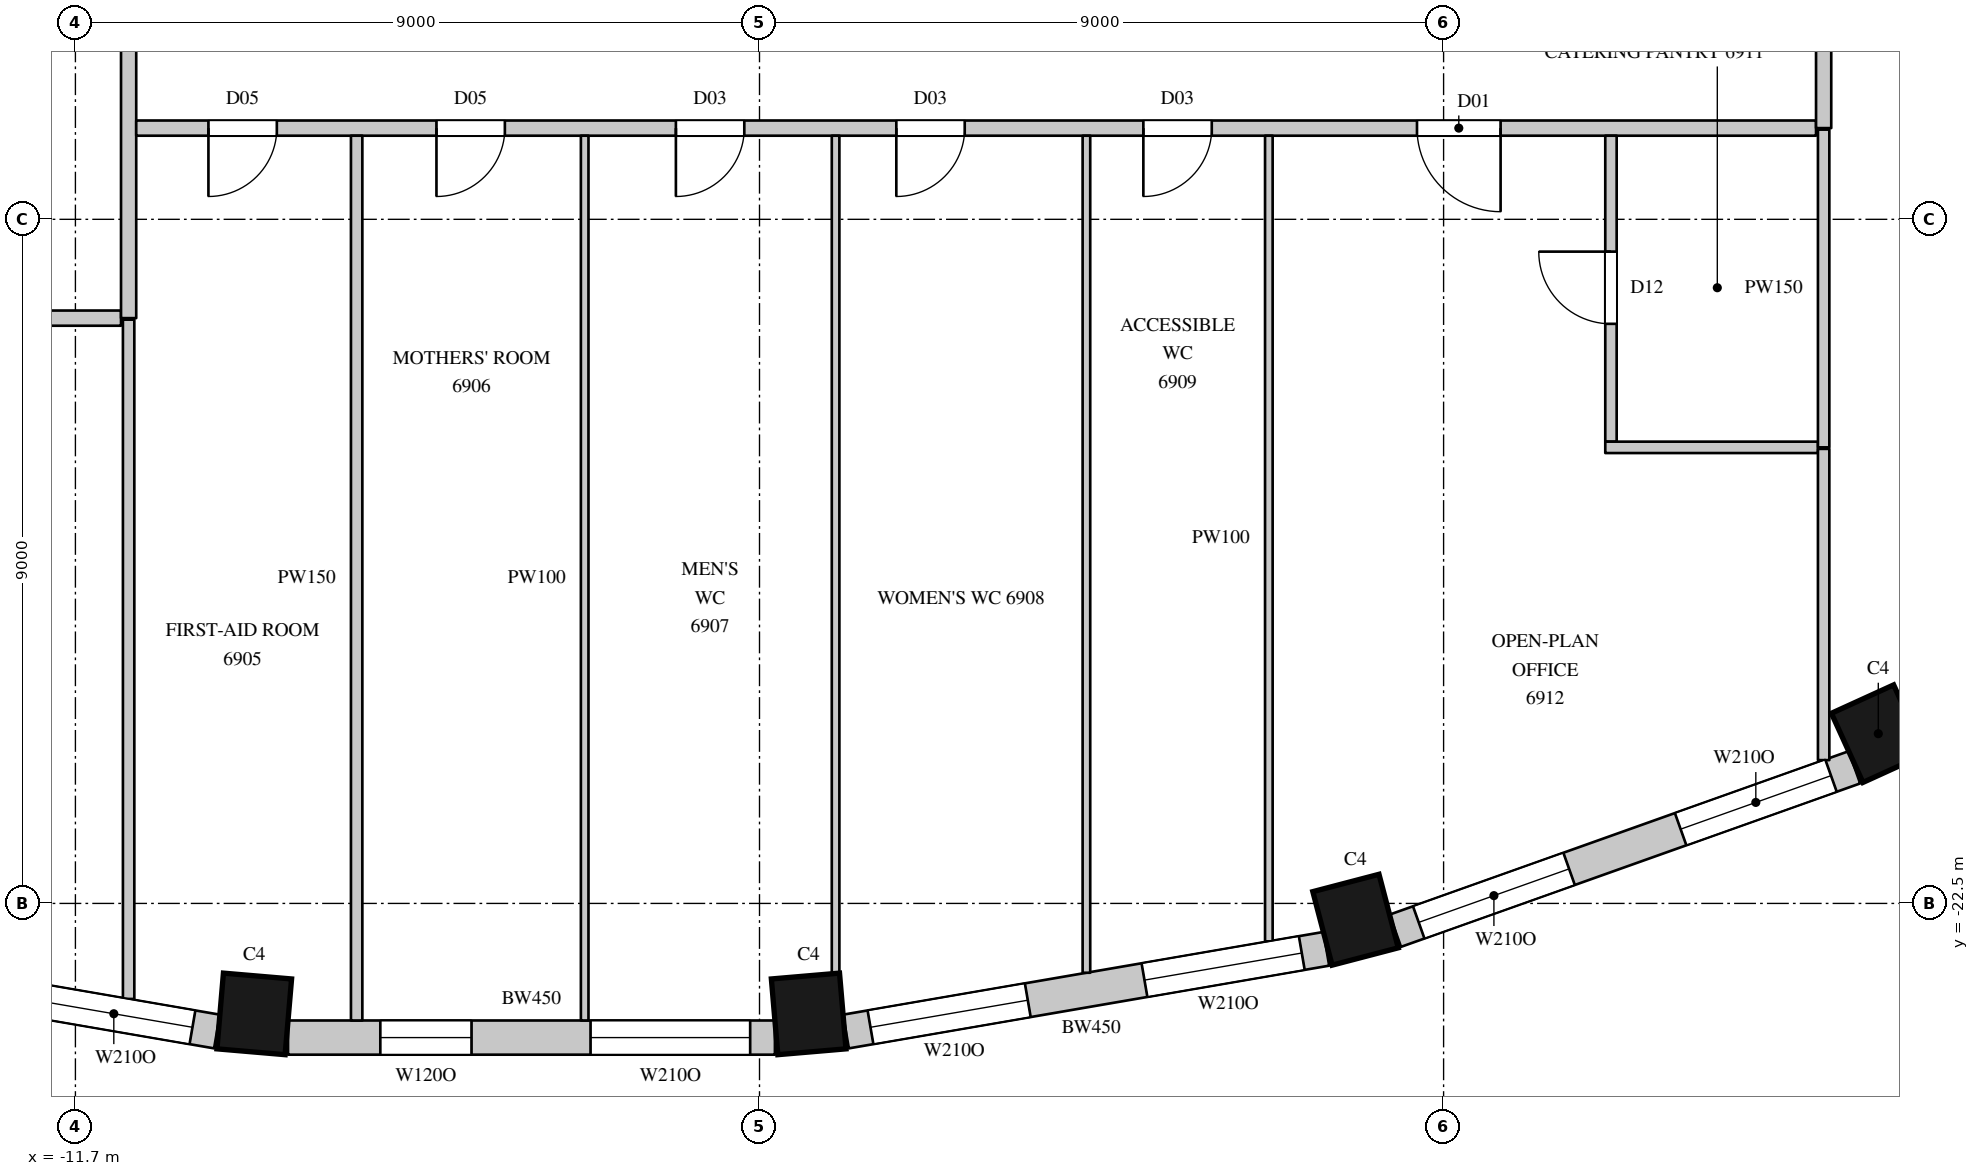
"""IFC4 building model, lengths in metres.
Left out: names, types, materials, properties, quantities, classifications, styles, units other than length and angle.
Written with IfcOpenShell. Run it as: python <this file> out.ifc"""

import sys

from ifc_helpers import new_model, si_unit, direction, frame, frame_2d, origin, origin_2d, place, context, subcontext, project, spatial, rectangle, extrude, element, fill, save


model = new_model("IFC4")
c1 = context("Model", 3, precision=1e-05, world=origin(), true_north=direction((0.0, 1.0)))
c2 = subcontext(c1, "Body", "Model", "MODEL_VIEW")
j1 = project(units=[si_unit("LENGTHUNIT", "METRE"), si_unit("PLANEANGLEUNIT", "RADIAN")], contexts=[c1])
p1 = place(None, origin())
s1 = spatial("IfcSite", under=j1, at=p1, CompositionType="ELEMENT")
p2 = place(p1, origin())
s2 = spatial("IfcBuilding", under=s1, at=p2, CompositionType="ELEMENT")
p3 = place(p2, frame((0.0, 0.0, 304.9)))
s3 = spatial("IfcBuildingStorey", under=s2, at=p3, CompositionType="ELEMENT", Elevation=304.9)
for number, where, z_axis, x_axis in (
    (1, (-9.347, -23.954, 0.0), (0.0, 0.0, 1.0), (0.996, -0.085, 0.0)),
    (2, (-2.053, -23.954, 0.0), (0.0, 0.0, 1.0), (0.996, 0.085, 0.0)),
    (3, (5.142, -22.715, 0.0), (0.0, 0.0, 1.0), (0.967, 0.253, 0.0)),
    (4, (12.019, -20.267, 0.0), (0.0, 0.0, 1.0), (0.91, 0.415, 0.0)),
):
    element("IfcColumn", number, at=place(p3, frame(where, z_axis=z_axis, x_axis=x_axis)), inside=s3, PredefinedType="COLUMN", context=c2, shape_type="SweptSolid", body=[
        extrude(rectangle(XDim=0.9, YDim=1.0, at=origin_2d()), origin(), (0.0, 0.0, 1.0), 4.1),
    ])
p4 = place(p3, frame((-16.157, -23.097, 0.0), z_axis=(0.0, 0.0, 1.0), x_axis=(0.985502073964, -0.169663379113, 0.0)))
e5 = element("IfcWall", 5, at=p4, inside=s3, PredefinedType="SOLIDWALL", context=c2, shape_type="SweptSolid", body=[
    extrude(rectangle(XDim=6.412, YDim=0.45, at=frame_2d((3.206, 0.0))), origin(), (0.0, 0.0, 1.0), 3.8),
])
p5 = place(p4, frame((0.327, 0.0, 1.05)))
e6 = element("IfcOpeningElement", 6, at=p5, cuts=e5, PredefinedType="OPENING", context=c2, shape_type="SweptSolid", body=[
    extrude(rectangle(XDim=2.1, YDim=2.4, at=frame_2d((1.05, 1.2))), frame((0.0, 0.235, 0.0), z_axis=(0.0, -1.0, 0.0), x_axis=(1.0, 0.0, 0.0)), (0.0, 0.0, 1.0), 0.47),
])
p6 = place(p4, frame((3.985, 0.0, 1.05)))
e7 = element("IfcOpeningElement", 7, at=p6, cuts=e5, PredefinedType="OPENING", context=c2, shape_type="SweptSolid", body=[
    extrude(rectangle(XDim=2.1, YDim=2.4, at=frame_2d((1.05, 1.2))), frame((0.0, 0.235, 0.0), z_axis=(0.0, -1.0, 0.0), x_axis=(1.0, 0.0, 0.0)), (0.0, 0.0, 1.0), 0.47),
])
p7 = place(p3, frame((-8.903, -24.265, 0.0), z_axis=(0.0, 0.0, 1.0), x_axis=(1.0, 0.0, 0.0)))
e8 = element("IfcWall", 8, at=p7, inside=s3, PredefinedType="SOLIDWALL", context=c2, shape_type="SweptSolid", body=[
    extrude(rectangle(XDim=6.406, YDim=0.45, at=frame_2d((3.203, 0.0))), origin(), (0.0, 0.0, 1.0), 3.8),
])
p8 = place(p7, frame((3.98, 0.0, 1.05)))
e9 = element("IfcOpeningElement", 9, at=p8, cuts=e8, PredefinedType="OPENING", context=c2, shape_type="SweptSolid", body=[
    extrude(rectangle(XDim=2.1, YDim=2.4, at=frame_2d((1.05, 1.2))), frame((0.0, 0.235, 0.0), z_axis=(0.0, -1.0, 0.0), x_axis=(1.0, 0.0, 0.0)), (0.0, 0.0, 1.0), 0.47),
])
p9 = place(p7, frame((1.214, 0.0, 1.05)))
e10 = element("IfcOpeningElement", 10, at=p9, cuts=e8, PredefinedType="OPENING", context=c2, shape_type="SweptSolid", body=[
    extrude(rectangle(XDim=1.2, YDim=2.4, at=frame_2d((0.6, 1.2))), frame((0.0, 0.235, 0.0), z_axis=(0.0, -1.0, 0.0), x_axis=(1.0, 0.0, 0.0)), (0.0, 0.0, 1.0), 0.47),
])
p10 = place(p3, frame((-1.562, -24.185, 0.0), z_axis=(0.0, 0.0, 1.0), x_axis=(0.985502073964, 0.169663379113, 0.0)))
e11 = element("IfcWall", 11, at=p10, inside=s3, PredefinedType="SOLIDWALL", context=c2, shape_type="SweptSolid", body=[
    extrude(rectangle(XDim=6.412, YDim=0.45, at=frame_2d((3.206, 0.0))), origin(), (0.0, 0.0, 1.0), 3.8),
])
p11 = place(p10, frame((0.327, 0.0, 1.05)))
e12 = element("IfcOpeningElement", 12, at=p11, cuts=e11, PredefinedType="OPENING", context=c2, shape_type="SweptSolid", body=[
    extrude(rectangle(XDim=2.1, YDim=2.4, at=frame_2d((1.05, 1.2))), frame((0.0, 0.235, 0.0), z_axis=(0.0, -1.0, 0.0), x_axis=(1.0, 0.0, 0.0)), (0.0, 0.0, 1.0), 0.47),
])
p12 = place(p10, frame((3.985, 0.0, 1.05)))
e13 = element("IfcOpeningElement", 13, at=p12, cuts=e11, PredefinedType="OPENING", context=c2, shape_type="SweptSolid", body=[
    extrude(rectangle(XDim=2.1, YDim=2.4, at=frame_2d((1.05, 1.2))), frame((0.0, 0.235, 0.0), z_axis=(0.0, -1.0, 0.0), x_axis=(1.0, 0.0, 0.0)), (0.0, 0.0, 1.0), 0.47),
])
p13 = place(p3, frame((5.665, -22.859, 0.0), z_axis=(0.0, 0.0, 1.0), x_axis=(0.942108340262, 0.335308626803, 0.0)))
e14 = element("IfcWall", 14, at=p13, inside=s3, PredefinedType="SOLIDWALL", context=c2, shape_type="SweptSolid", body=[
    extrude(rectangle(XDim=6.412, YDim=0.45, at=frame_2d((3.206, 0.0))), origin(), (0.0, 0.0, 1.0), 3.8),
])
p14 = place(p13, frame((0.327, 0.0, 1.05)))
e15 = element("IfcOpeningElement", 15, at=p14, cuts=e14, PredefinedType="OPENING", context=c2, shape_type="SweptSolid", body=[
    extrude(rectangle(XDim=2.1, YDim=2.4, at=frame_2d((1.05, 1.2))), frame((0.0, 0.235, 0.0), z_axis=(0.0, -1.0, 0.0), x_axis=(1.0, 0.0, 0.0)), (0.0, 0.0, 1.0), 0.47),
])
p15 = place(p13, frame((3.985, 0.0, 1.05)))
e16 = element("IfcOpeningElement", 16, at=p15, cuts=e14, PredefinedType="OPENING", context=c2, shape_type="SweptSolid", body=[
    extrude(rectangle(XDim=2.1, YDim=2.4, at=frame_2d((1.05, 1.2))), frame((0.0, 0.235, 0.0), z_axis=(0.0, -1.0, 0.0), x_axis=(1.0, 0.0, 0.0)), (0.0, 0.0, 1.0), 0.47),
])
p16 = place(p3, frame((-13.97, -14.8, 0.0), z_axis=(0.0, 0.0, 1.0), x_axis=(1.0, 0.0, 0.0)))
e17 = element("IfcWall", 17, at=p16, inside=s3, PredefinedType="PARTITIONING", context=c2, shape_type="SweptSolid", body=[
    extrude(rectangle(XDim=2.87, YDim=0.2, at=frame_2d((1.435, 0.0))), origin(), (0.0, 0.0, 1.0), 3.8),
])
p17 = place(p3, frame((-11.0, -14.8, 0.0), z_axis=(0.0, 0.0, 1.0), x_axis=(0.0, 1.0, 0.0)))
e18 = element("IfcWall", 18, at=p17, inside=s3, PredefinedType="PARTITIONING", context=c2, shape_type="SweptSolid", body=[
    extrude(rectangle(XDim=29.5, YDim=0.2, at=frame_2d((14.75, 0.0))), origin(), (0.0, 0.0, 1.0), 3.8),
])
p18 = place(p17, frame((14.05, 0.0, 0.0)))
e19 = element("IfcOpeningElement", 19, at=p18, cuts=e18, PredefinedType="OPENING", context=c2, shape_type="SweptSolid", body=[
    extrude(rectangle(XDim=1.5, YDim=2.4, at=frame_2d((0.75, 1.2))), frame((0.0, 0.11, 0.0), z_axis=(0.0, -1.0, 0.0), x_axis=(1.0, 0.0, 0.0)), (0.0, 0.0, 1.0), 0.22),
])
p19 = place(p3, frame((-10.9, -12.3, 0.0), z_axis=(0.0, 0.0, 1.0), x_axis=(1.0, 0.0, 0.0)))
e20 = element("IfcWall", 20, at=p19, inside=s3, PredefinedType="PARTITIONING", context=c2, shape_type="SweptSolid", body=[
    extrude(rectangle(XDim=22.1, YDim=0.2, at=frame_2d((11.05, 0.0))), origin(), (0.0, 0.0, 1.0), 3.8),
])
p20 = place(p19, frame((0.95, 0.0, 0.0)))
e21 = element("IfcOpeningElement", 21, at=p20, cuts=e20, PredefinedType="OPENING", context=c2, shape_type="SweptSolid", body=[
    extrude(rectangle(XDim=0.9, YDim=2.2, at=frame_2d((0.45, 1.1))), frame((0.0, 0.11, 0.0), z_axis=(0.0, -1.0, 0.0), x_axis=(1.0, 0.0, 0.0)), (0.0, 0.0, 1.0), 0.22),
])
p21 = place(p19, frame((3.95, 0.0, 0.0)))
e22 = element("IfcOpeningElement", 22, at=p21, cuts=e20, PredefinedType="OPENING", context=c2, shape_type="SweptSolid", body=[
    extrude(rectangle(XDim=0.9, YDim=2.2, at=frame_2d((0.45, 1.1))), frame((0.0, 0.11, 0.0), z_axis=(0.0, -1.0, 0.0), x_axis=(1.0, 0.0, 0.0)), (0.0, 0.0, 1.0), 0.22),
])
p22 = place(p19, frame((7.1, 0.0, 0.0)))
e23 = element("IfcOpeningElement", 23, at=p22, cuts=e20, PredefinedType="OPENING", context=c2, shape_type="SweptSolid", body=[
    extrude(rectangle(XDim=0.9, YDim=2.2, at=frame_2d((0.45, 1.1))), frame((0.0, 0.11, 0.0), z_axis=(0.0, -1.0, 0.0), x_axis=(1.0, 0.0, 0.0)), (0.0, 0.0, 1.0), 0.22),
])
p23 = place(p19, frame((10.0, 0.0, 0.0)))
e24 = element("IfcOpeningElement", 24, at=p23, cuts=e20, PredefinedType="OPENING", context=c2, shape_type="SweptSolid", body=[
    extrude(rectangle(XDim=0.9, YDim=2.2, at=frame_2d((0.45, 1.1))), frame((0.0, 0.11, 0.0), z_axis=(0.0, -1.0, 0.0), x_axis=(1.0, 0.0, 0.0)), (0.0, 0.0, 1.0), 0.22),
])
p24 = place(p19, frame((13.25, 0.0, 0.0)))
e25 = element("IfcOpeningElement", 25, at=p24, cuts=e20, PredefinedType="OPENING", context=c2, shape_type="SweptSolid", body=[
    extrude(rectangle(XDim=0.9, YDim=2.2, at=frame_2d((0.45, 1.1))), frame((0.0, 0.11, 0.0), z_axis=(0.0, -1.0, 0.0), x_axis=(1.0, 0.0, 0.0)), (0.0, 0.0, 1.0), 0.22),
])
p25 = place(p19, frame((16.85, 0.0, 0.0)))
e26 = element("IfcOpeningElement", 26, at=p25, cuts=e20, PredefinedType="OPENING", context=c2, shape_type="SweptSolid", body=[
    extrude(rectangle(XDim=1.1, YDim=2.4, at=frame_2d((0.55, 1.2))), frame((0.0, 0.11, 0.0), z_axis=(0.0, -1.0, 0.0), x_axis=(1.0, 0.0, 0.0)), (0.0, 0.0, 1.0), 0.22),
])
p26 = place(p3, frame((11.3, -12.3, 0.0), z_axis=(0.0, 0.0, 1.0), x_axis=(0.0, 1.0, 0.0)))
e27 = element("IfcWall", 27, at=p26, inside=s3, PredefinedType="PARTITIONING", context=c2, shape_type="SweptSolid", body=[
    extrude(rectangle(XDim=24.5, YDim=0.2, at=frame_2d((12.25, 0.0))), origin(), (0.0, 0.0, 1.0), 3.8),
])
p27 = place(p26, frame((10.15, 0.0, 0.0)))
e28 = element("IfcOpeningElement", 28, at=p27, cuts=e27, PredefinedType="OPENING", context=c2, shape_type="SweptSolid", body=[
    extrude(rectangle(XDim=1.5, YDim=2.4, at=frame_2d((0.75, 1.2))), frame((0.0, 0.11, 0.0), z_axis=(0.0, -1.0, 0.0), x_axis=(1.0, 0.0, 0.0)), (0.0, 0.0, 1.0), 0.22),
])
p28 = place(p3, frame((-11.0, -23.757, 0.0), z_axis=(0.0, 0.0, 1.0), x_axis=(0.0, 1.0, 0.0)))
e29 = element("IfcWall", 29, at=p28, inside=s3, PredefinedType="PARTITIONING", context=c2, shape_type="SweptSolid", body=[
    extrude(rectangle(XDim=8.937, YDim=0.15, at=frame_2d((4.468, 0.0))), origin(), (0.0, 0.0, 1.0), 3.8),
])
p29 = place(p3, frame((-8.0, -24.04, 0.0), z_axis=(0.0, 0.0, 1.0), x_axis=(0.0, 1.0, 0.0)))
e30 = element("IfcWall", 30, at=p29, inside=s3, PredefinedType="PARTITIONING", context=c2, shape_type="SweptSolid", body=[
    extrude(rectangle(XDim=11.64, YDim=0.15, at=frame_2d((5.82, 0.0))), origin(), (0.0, 0.0, 1.0), 3.8),
])
p30 = place(p3, frame((8.502, -16.425, 0.0), z_axis=(0.0, 0.0, 1.0), x_axis=(0.0, 1.0, 0.0)))
e31 = element("IfcWall", 31, at=p30, inside=s3, PredefinedType="PARTITIONING", context=c2, shape_type="SweptSolid", body=[
    extrude(rectangle(XDim=4.025, YDim=0.15, at=frame_2d((2.013, 0.0))), origin(), (0.0, 0.0, 1.0), 3.8),
])
p31 = place(p30, frame((1.55, 0.0, 0.0)))
e32 = element("IfcOpeningElement", 32, at=p31, cuts=e31, PredefinedType="OPENING", context=c2, shape_type="SweptSolid", body=[
    extrude(rectangle(XDim=0.95, YDim=2.2, at=frame_2d((0.475, 1.1))), frame((0.0, 0.085, 0.0), z_axis=(0.0, -1.0, 0.0), x_axis=(1.0, 0.0, 0.0)), (0.0, 0.0, 1.0), 0.17),
])
p32 = place(p3, frame((8.427, -16.5, 0.0), z_axis=(0.0, 0.0, 1.0), x_axis=(1.0, 0.0, 0.0)))
e33 = element("IfcWall", 33, at=p32, inside=s3, PredefinedType="PARTITIONING", context=c2, shape_type="SweptSolid", body=[
    extrude(rectangle(XDim=2.798, YDim=0.15, at=frame_2d((1.399, 0.0))), origin(), (0.0, 0.0, 1.0), 3.8),
])
p33 = place(p3, frame((11.3, -20.615, 0.0), z_axis=(0.0, 0.0, 1.0), x_axis=(0.0, 1.0, 0.0)))
e34 = element("IfcWall", 34, at=p33, inside=s3, PredefinedType="PARTITIONING", context=c2, shape_type="SweptSolid", body=[
    extrude(rectangle(XDim=4.095, YDim=0.15, at=frame_2d((2.047, 0.0))), origin(), (0.0, 0.0, 1.0), 3.8),
])
p34 = place(p3, frame((11.3, -16.5, 0.0), z_axis=(0.0, 0.0, 1.0), x_axis=(0.0, 1.0, 0.0)))
e35 = element("IfcWall", 35, at=p34, inside=s3, PredefinedType="PARTITIONING", context=c2, shape_type="SweptSolid", body=[
    extrude(rectangle(XDim=4.18, YDim=0.15, at=frame_2d((2.09, 0.0))), origin(), (0.0, 0.0, 1.0), 3.8),
])
p35 = place(p3, frame((-5.0, -24.04, 0.0), z_axis=(0.0, 0.0, 1.0), x_axis=(0.0, 1.0, 0.0)))
e36 = element("IfcWall", 36, at=p35, inside=s3, PredefinedType="PARTITIONING", context=c2, shape_type="SweptSolid", body=[
    extrude(rectangle(XDim=11.64, YDim=0.1, at=frame_2d((5.82, 0.0))), origin(), (0.0, 0.0, 1.0), 3.8),
])
p36 = place(p3, frame((-1.699, -23.421, 0.0), z_axis=(0.0, 0.0, 1.0), x_axis=(0.0, 1.0, 0.0)))
e37 = element("IfcWall", 37, at=p36, inside=s3, PredefinedType="PARTITIONING", context=c2, shape_type="SweptSolid", body=[
    extrude(rectangle(XDim=11.021, YDim=0.1, at=frame_2d((5.511, 0.0))), origin(), (0.0, 0.0, 1.0), 3.8),
])
p37 = place(p3, frame((1.601, -23.412, 0.0), z_axis=(0.0, 0.0, 1.0), x_axis=(0.0, 1.0, 0.0)))
e38 = element("IfcWall", 38, at=p37, inside=s3, PredefinedType="PARTITIONING", context=c2, shape_type="SweptSolid", body=[
    extrude(rectangle(XDim=11.012, YDim=0.1, at=frame_2d((5.506, 0.0))), origin(), (0.0, 0.0, 1.0), 3.8),
])
p38 = place(p3, frame((4.001, -22.999, 0.0), z_axis=(0.0, 0.0, 1.0), x_axis=(0.0, 1.0, 0.0)))
e39 = element("IfcWall", 39, at=p38, inside=s3, PredefinedType="PARTITIONING", context=c2, shape_type="SweptSolid", body=[
    extrude(rectangle(XDim=10.599, YDim=0.1, at=frame_2d((5.3, 0.0))), origin(), (0.0, 0.0, 1.0), 3.8),
])
p39 = place(p6, origin())
e40 = element("IfcWindow", 40, at=p39, inside=s3, PartitioningType="SINGLE_PANEL", PredefinedType="WINDOW", context=c2, shape_type="SweptSolid", body=[
    extrude(rectangle(XDim=2.1, YDim=2.4, at=frame_2d((1.05, 1.2))), frame((0.0, 0.135, 0.0), z_axis=(0.0, -1.0, 0.0), x_axis=(1.0, 0.0, 0.0)), (0.0, 0.0, 1.0), 0.06),
])
fill(e7, e40)
p40 = place(p8, origin())
e41 = element("IfcWindow", 41, at=p40, inside=s3, PartitioningType="SINGLE_PANEL", PredefinedType="WINDOW", context=c2, shape_type="SweptSolid", body=[
    extrude(rectangle(XDim=2.1, YDim=2.4, at=frame_2d((1.05, 1.2))), frame((0.0, 0.135, 0.0), z_axis=(0.0, -1.0, 0.0), x_axis=(1.0, 0.0, 0.0)), (0.0, 0.0, 1.0), 0.06),
])
fill(e9, e41)
p41 = place(p11, origin())
e42 = element("IfcWindow", 42, at=p41, inside=s3, PartitioningType="SINGLE_PANEL", PredefinedType="WINDOW", context=c2, shape_type="SweptSolid", body=[
    extrude(rectangle(XDim=2.1, YDim=2.4, at=frame_2d((1.05, 1.2))), frame((0.0, 0.135, 0.0), z_axis=(0.0, -1.0, 0.0), x_axis=(1.0, 0.0, 0.0)), (0.0, 0.0, 1.0), 0.06),
])
fill(e12, e42)
p42 = place(p12, origin())
e43 = element("IfcWindow", 43, at=p42, inside=s3, PartitioningType="SINGLE_PANEL", PredefinedType="WINDOW", context=c2, shape_type="SweptSolid", body=[
    extrude(rectangle(XDim=2.1, YDim=2.4, at=frame_2d((1.05, 1.2))), frame((0.0, 0.135, 0.0), z_axis=(0.0, -1.0, 0.0), x_axis=(1.0, 0.0, 0.0)), (0.0, 0.0, 1.0), 0.06),
])
fill(e13, e43)
p43 = place(p14, origin())
e44 = element("IfcWindow", 44, at=p43, inside=s3, PartitioningType="SINGLE_PANEL", PredefinedType="WINDOW", context=c2, shape_type="SweptSolid", body=[
    extrude(rectangle(XDim=2.1, YDim=2.4, at=frame_2d((1.05, 1.2))), frame((0.0, 0.135, 0.0), z_axis=(0.0, -1.0, 0.0), x_axis=(1.0, 0.0, 0.0)), (0.0, 0.0, 1.0), 0.06),
])
fill(e15, e44)
p44 = place(p15, origin())
e45 = element("IfcWindow", 45, at=p44, inside=s3, PartitioningType="SINGLE_PANEL", PredefinedType="WINDOW", context=c2, shape_type="SweptSolid", body=[
    extrude(rectangle(XDim=2.1, YDim=2.4, at=frame_2d((1.05, 1.2))), frame((0.0, 0.135, 0.0), z_axis=(0.0, -1.0, 0.0), x_axis=(1.0, 0.0, 0.0)), (0.0, 0.0, 1.0), 0.06),
])
fill(e16, e45)
p45 = place(p20, origin())
e46 = element("IfcDoor", 46, at=p45, inside=s3, OperationType="SINGLE_SWING_RIGHT", PredefinedType="DOOR", context=c2, shape_type="SweptSolid", body=[
    extrude(rectangle(XDim=0.9, YDim=2.2, at=frame_2d((0.45, 1.1))), frame((0.0, 0.025, 0.0), z_axis=(0.0, -1.0, 0.0), x_axis=(1.0, 0.0, 0.0)), (0.0, 0.0, 1.0), 0.05),
])
fill(e21, e46)
p46 = place(p21, origin())
e47 = element("IfcDoor", 47, at=p46, inside=s3, OperationType="SINGLE_SWING_RIGHT", PredefinedType="DOOR", context=c2, shape_type="SweptSolid", body=[
    extrude(rectangle(XDim=0.9, YDim=2.2, at=frame_2d((0.45, 1.1))), frame((0.0, 0.025, 0.0), z_axis=(0.0, -1.0, 0.0), x_axis=(1.0, 0.0, 0.0)), (0.0, 0.0, 1.0), 0.05),
])
fill(e22, e47)
p47 = place(p22, origin())
e48 = element("IfcDoor", 48, at=p47, inside=s3, OperationType="SINGLE_SWING_RIGHT", PredefinedType="DOOR", context=c2, shape_type="SweptSolid", body=[
    extrude(rectangle(XDim=0.9, YDim=2.2, at=frame_2d((0.45, 1.1))), frame((0.0, 0.025, 0.0), z_axis=(0.0, -1.0, 0.0), x_axis=(1.0, 0.0, 0.0)), (0.0, 0.0, 1.0), 0.05),
])
fill(e23, e48)
p48 = place(p23, origin())
e49 = element("IfcDoor", 49, at=p48, inside=s3, OperationType="SINGLE_SWING_RIGHT", PredefinedType="DOOR", context=c2, shape_type="SweptSolid", body=[
    extrude(rectangle(XDim=0.9, YDim=2.2, at=frame_2d((0.45, 1.1))), frame((0.0, 0.025, 0.0), z_axis=(0.0, -1.0, 0.0), x_axis=(1.0, 0.0, 0.0)), (0.0, 0.0, 1.0), 0.05),
])
fill(e24, e49)
p49 = place(p24, origin())
e50 = element("IfcDoor", 50, at=p49, inside=s3, OperationType="SINGLE_SWING_RIGHT", PredefinedType="DOOR", context=c2, shape_type="SweptSolid", body=[
    extrude(rectangle(XDim=0.9, YDim=2.2, at=frame_2d((0.45, 1.1))), frame((0.0, 0.025, 0.0), z_axis=(0.0, -1.0, 0.0), x_axis=(1.0, 0.0, 0.0)), (0.0, 0.0, 1.0), 0.05),
])
fill(e25, e50)
p50 = place(p25, origin())
e51 = element("IfcDoor", 51, at=p50, inside=s3, OperationType="SINGLE_SWING_LEFT", PredefinedType="DOOR", context=c2, shape_type="SweptSolid", body=[
    extrude(rectangle(XDim=1.1, YDim=2.4, at=frame_2d((0.55, 1.2))), frame((0.0, 0.025, 0.0), z_axis=(0.0, -1.0, 0.0), x_axis=(1.0, 0.0, 0.0)), (0.0, 0.0, 1.0), 0.05),
])
fill(e26, e51)
p51 = place(p31, origin())
e52 = element("IfcDoor", 52, at=p51, inside=s3, OperationType="SINGLE_SWING_RIGHT", PredefinedType="DOOR", context=c2, shape_type="SweptSolid", body=[
    extrude(rectangle(XDim=0.95, YDim=2.2, at=frame_2d((0.475, 1.1))), frame((0.0, 0.025, 0.0), z_axis=(0.0, -1.0, 0.0), x_axis=(1.0, 0.0, 0.0)), (0.0, 0.0, 1.0), 0.05),
])
fill(e32, e52)
p52 = place(p9, origin())
e53 = element("IfcWindow", 53, at=p52, inside=s3, PartitioningType="SINGLE_PANEL", PredefinedType="WINDOW", context=c2, shape_type="SweptSolid", body=[
    extrude(rectangle(XDim=1.2, YDim=2.4, at=frame_2d((0.6, 1.2))), frame((0.0, 0.135, 0.0), z_axis=(0.0, -1.0, 0.0), x_axis=(1.0, 0.0, 0.0)), (0.0, 0.0, 1.0), 0.06),
])
fill(e10, e53)
save(model, sys.argv[1])
